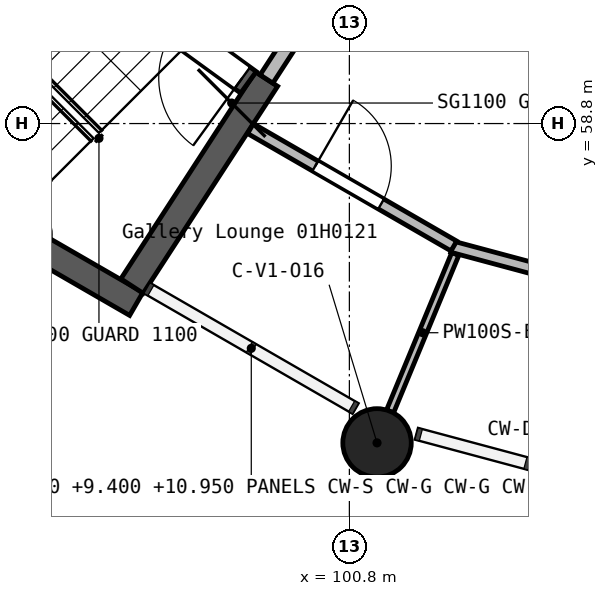
"""IFC4 building model, lengths in metres.
Left out: names, types, materials, properties, quantities, classifications, styles, units other than length and angle.
Written with IfcOpenShell. Run it as: python <this file> out.ifc"""

import sys

from ifc_helpers import new_model, si_unit, direction, frame, frame_2d, origin, origin_2d, place, context, subcontext, project, spatial, rectangle, circle, extrude, element, fill, save


model = new_model("IFC4")
c1 = context("Model", 3, precision=1e-05, world=origin(), true_north=direction((0.0, 1.0)))
c2 = subcontext(c1, "Body", "Model", "MODEL_VIEW")
j1 = project(units=[si_unit("LENGTHUNIT", "METRE"), si_unit("PLANEANGLEUNIT", "RADIAN")], contexts=[c1])
p1 = place(None, origin())
s1 = spatial("IfcSite", under=j1, at=p1, CompositionType="ELEMENT")
p2 = place(p1, origin())
s2 = spatial("IfcBuilding", under=s1, at=p2, CompositionType="ELEMENT")
p3 = place(p2, frame((0.0, 0.0, 5.4)))
s3 = spatial("IfcBuildingStorey", under=s2, at=p3, CompositionType="ELEMENT", Elevation=5.4)
for number, where, z_axis, x_axis in (
    (1, (101.164, 54.599, 0.0), (0.0, 0.0, 1.0), (1.0, 0.0, 0.0)),
    (2, (103.46, 60.142, 0.0), (0.0, 0.0, 1.0), (1.0, 0.0, 0.0)),
):
    element("IfcColumn", number, at=place(p3, frame(where, z_axis=z_axis, x_axis=x_axis)), inside=s3, PredefinedType="COLUMN", context=c2, shape_type="SweptSolid", body=[
        extrude(circle(Radius=0.45, at=origin_2d()), origin(), (0.0, 0.0, 1.0), 4.5),
    ])
p4 = place(p3, frame((96.436, 57.328, 0.0), z_axis=(0.0, 0.0, 1.0), x_axis=(0.866050214951, -0.499957023337, 0.0)))
e3 = element("IfcWall", 3, at=p4, inside=s3, PredefinedType="SHEAR", context=c2, shape_type="SweptSolid", body=[
    extrude(rectangle(XDim=1.802, YDim=0.35, at=frame_2d((0.901, 0.0))), origin(), (0.0, 0.0, 1.0), 4.5),
])
p5 = place(p3, frame((97.94, 56.662, 0.0), z_axis=(0.0, 0.0, 1.0), x_axis=(0.544615743299, 0.838685693303, 0.0)))
e4 = element("IfcWall", 4, at=p5, inside=s3, PredefinedType="SHEAR", context=c2, shape_type="SweptSolid", body=[
    extrude(rectangle(XDim=3.248, YDim=0.35, at=frame_2d((1.624, 0.0))), origin(), (0.0, 0.0, 1.0), 4.5),
])
p6 = place(p3, frame((99.472, 59.342, 0.0), z_axis=(0.0, 0.0, 1.0), x_axis=(-0.808869786542, 0.587987813155, 0.0)))
e5 = element("IfcWall", 5, at=p6, inside=s3, PredefinedType="SHEAR", context=c2, shape_type="SweptSolid", body=[
    extrude(rectangle(XDim=1.658, YDim=0.35, at=frame_2d((0.829, 0.0))), origin(), (0.0, 0.0, 1.0), 4.5),
])
p7 = place(p6, frame((0.1, 0.0, 0.0)))
e6 = element("IfcOpeningElement", 6, at=p7, cuts=e5, PredefinedType="OPENING", context=c2, shape_type="SweptSolid", body=[
    extrude(rectangle(XDim=1.1, YDim=2.1, at=frame_2d((0.55, 1.05))), frame((0.0, 0.185, 0.0), z_axis=(0.0, -1.0, 0.0), x_axis=(1.0, 0.0, 0.0)), (0.0, 0.0, 1.0), 0.37),
])
p8 = place(p3, frame((99.709, 59.386, 0.0), z_axis=(0.0, 0.0, 1.0), x_axis=(0.544553338247, 0.838726213853, 0.0)))
e7 = element("IfcWall", 7, at=p8, inside=s3, PredefinedType="SOLIDWALL", context=c2, shape_type="SweptSolid", body=[
    extrude(rectangle(XDim=2.525, YDim=0.2, at=frame_2d((1.263, 0.0))), origin(), (0.0, 0.0, 1.0), 4.15),
])
p9 = place(p3, frame((102.153, 57.179, 0.0), z_axis=(0.0, 0.0, 1.0), x_axis=(0.965887773881, -0.258961016886, 0.0)))
e8 = element("IfcWall", 8, at=p9, inside=s3, PredefinedType="PARTITIONING", context=c2, shape_type="SweptSolid", body=[
    extrude(rectangle(XDim=4.774, YDim=0.15, at=frame_2d((2.387, 0.0))), origin(), (0.0, 0.0, 1.0), 4.15),
])
p10 = place(p3, frame((99.499, 58.733, 0.0), z_axis=(0.0, 0.0, 1.0), x_axis=(0.866085584755, -0.499895749011, 0.0)))
e9 = element("IfcWall", 9, at=p10, inside=s3, PredefinedType="PARTITIONING", context=c2, shape_type="SweptSolid", body=[
    extrude(rectangle(XDim=3.09, YDim=0.15, at=frame_2d((1.545, 0.0))), origin(), (0.0, 0.0, 1.0), 4.15),
])
p11 = place(p10, frame((0.984, 0.0, 0.0)))
e10 = element("IfcOpeningElement", 10, at=p11, cuts=e9, PredefinedType="OPENING", context=c2, shape_type="SweptSolid", body=[
    extrude(rectangle(XDim=1.0, YDim=2.1, at=frame_2d((0.5, 1.05))), frame((0.0, 0.085, 0.0), z_axis=(0.0, -1.0, 0.0), x_axis=(1.0, 0.0, 0.0)), (0.0, 0.0, 1.0), 0.17),
])
p12 = place(p3, frame((101.335, 55.012, 0.0), z_axis=(0.0, 0.0, 1.0), x_axis=(0.382736345947, 0.923857613213, 0.0)))
e11 = element("IfcWall", 11, at=p12, inside=s3, PredefinedType="PARTITIONING", context=c2, shape_type="SweptSolid", body=[
    extrude(rectangle(XDim=2.243, YDim=0.1, at=frame_2d((1.121, 0.0))), origin(), (0.0, 0.0, 1.0), 4.15),
])
p13 = place(p11, frame((1.0, 0.0, 0.0), z_axis=(0.0, 0.0, 1.0), x_axis=(-1.0, 0.0, 0.0)))
e12 = element("IfcDoor", 12, at=p13, inside=s3, OperationType="SINGLE_SWING_RIGHT", PredefinedType="DOOR", context=c2, shape_type="SweptSolid", body=[
    extrude(rectangle(XDim=1.0, YDim=2.1, at=frame_2d((0.5, 1.05))), frame((0.0, 0.025, 0.0), z_axis=(0.0, -1.0, 0.0), x_axis=(1.0, 0.0, 0.0)), (0.0, 0.0, 1.0), 0.05),
])
fill(e10, e12)
p14 = place(p7, origin())
e13 = element("IfcDoor", 13, at=p14, inside=s3, OperationType="SINGLE_SWING_LEFT", PredefinedType="DOOR", context=c2, shape_type="SweptSolid", body=[
    extrude(rectangle(XDim=1.1, YDim=2.1, at=frame_2d((0.55, 1.05))), frame((0.0, 0.025, 0.0), z_axis=(0.0, -1.0, 0.0), x_axis=(1.0, 0.0, 0.0)), (0.0, 0.0, 1.0), 0.05),
])
fill(e6, e13)
save(model, sys.argv[1])
